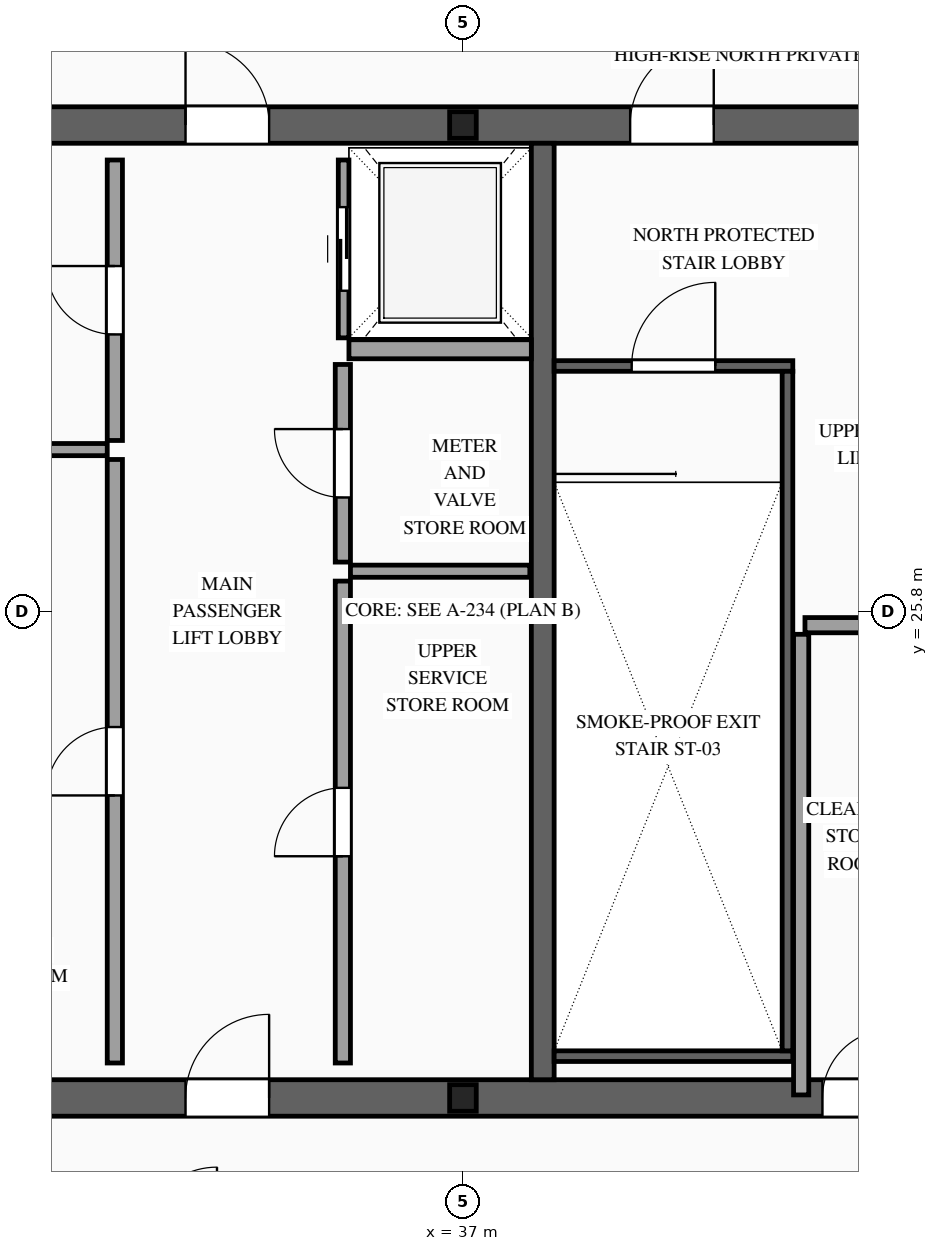
"""IFC4 building model, lengths in metres.
Left out: names, types, materials, properties, quantities, classifications, styles, units other than length and angle.
Written with IfcOpenShell. Run it as: python <this file> out.ifc"""

import sys

from ifc_helpers import new_model, si_unit, direction, frame, frame_2d, origin, origin_2d, place, context, subcontext, project, spatial, rectangle, i_section, extrude, source, transform, mapped, element, fill, save


model = new_model("IFC4")
c1 = context("Model", 3, precision=1e-05, world=origin(), true_north=direction((0.0, 1.0)))
c2 = subcontext(c1, "Body", "Model", "MODEL_VIEW")
j1 = project(units=[si_unit("LENGTHUNIT", "METRE"), si_unit("PLANEANGLEUNIT", "RADIAN")], contexts=[c1])
p1 = place(None, origin())
s1 = spatial("IfcSite", under=j1, at=p1, CompositionType="ELEMENT")
p2 = place(p1, origin())
s2 = spatial("IfcBuilding", under=s1, at=p2, CompositionType="ELEMENT")
p3 = place(p2, frame((0.0, 0.0, 347.2)))
s3 = spatial("IfcBuildingStorey", under=s2, at=p3, CompositionType="ELEMENT", Elevation=347.2)
p4 = place(p3, frame((23.56, 19.4, 0.0), z_axis=(0.0, 0.0, 1.0), x_axis=(1.0, 0.0, 0.0)))
e1 = element("IfcWall", 1, at=p4, inside=s3, PredefinedType="SHEAR", context=c2, shape_type="SweptSolid", body=[
    extrude(rectangle(XDim=26.88, YDim=0.48, at=frame_2d((13.44, 0.0))), origin(), (0.0, 0.0, 1.0), 4.0),
])
p5 = place(p4, frame((1.89, 0.0, 0.0)))
e2 = element("IfcOpeningElement", 2, at=p5, cuts=e1, PredefinedType="OPENING", context=c2, shape_type="SweptSolid", body=[
    extrude(rectangle(XDim=1.1, YDim=2.2, at=frame_2d((0.55, 1.1))), frame((0.0, 0.255, 0.0), z_axis=(0.0, -1.0, 0.0), x_axis=(1.0, 0.0, 0.0)), (0.0, 0.0, 1.0), 0.51),
])
p6 = place(p4, frame((9.79, 0.0, 0.0)))
e3 = element("IfcOpeningElement", 3, at=p6, cuts=e1, PredefinedType="OPENING", context=c2, shape_type="SweptSolid", body=[
    extrude(rectangle(XDim=1.1, YDim=2.2, at=frame_2d((0.55, 1.1))), frame((0.0, 0.255, 0.0), z_axis=(0.0, -1.0, 0.0), x_axis=(1.0, 0.0, 0.0)), (0.0, 0.0, 1.0), 0.51),
])
p7 = place(p4, frame((22.99, 0.0, 0.0)))
e4 = element("IfcOpeningElement", 4, at=p7, cuts=e1, PredefinedType="OPENING", context=c2, shape_type="SweptSolid", body=[
    extrude(rectangle(XDim=1.1, YDim=2.2, at=frame_2d((0.55, 1.1))), frame((0.0, 0.255, 0.0), z_axis=(0.0, -1.0, 0.0), x_axis=(1.0, 0.0, 0.0)), (0.0, 0.0, 1.0), 0.51),
])
p8 = place(p4, frame((19.61, 0.0, 0.0)))
e5 = element("IfcOpeningElement", 5, at=p8, cuts=e1, PredefinedType="OPENING", context=c2, shape_type="SweptSolid", body=[
    extrude(rectangle(XDim=0.9, YDim=2.15, at=frame_2d((0.45, 1.075))), frame((0.0, 0.255, 0.0), z_axis=(0.0, -1.0, 0.0), x_axis=(1.0, 0.0, 0.0)), (0.0, 0.0, 1.0), 0.51),
])
p9 = place(p4, frame((18.17, 0.0, 0.0)))
e6 = element("IfcOpeningElement", 6, at=p9, cuts=e1, PredefinedType="OPENING", context=c2, shape_type="SweptSolid", body=[
    extrude(rectangle(XDim=0.9, YDim=2.15, at=frame_2d((0.45, 1.075))), frame((0.0, 0.255, 0.0), z_axis=(0.0, -1.0, 0.0), x_axis=(1.0, 0.0, 0.0)), (0.0, 0.0, 1.0), 0.51),
])
p10 = place(p3, frame((23.56, 32.2, 0.0), z_axis=(0.0, 0.0, 1.0), x_axis=(1.0, 0.0, 0.0)))
e7 = element("IfcWall", 7, at=p10, inside=s3, PredefinedType="SHEAR", context=c2, shape_type="SweptSolid", body=[
    extrude(rectangle(XDim=26.88, YDim=0.48, at=frame_2d((13.44, 0.0))), origin(), (0.0, 0.0, 1.0), 4.0),
])
p11 = place(p10, frame((4.51, 0.0, 0.0)))
e8 = element("IfcOpeningElement", 8, at=p11, cuts=e7, PredefinedType="OPENING", context=c2, shape_type="SweptSolid", body=[
    extrude(rectangle(XDim=0.9, YDim=2.15, at=frame_2d((0.45, 1.075))), frame((0.0, 0.255, 0.0), z_axis=(0.0, -1.0, 0.0), x_axis=(1.0, 0.0, 0.0)), (0.0, 0.0, 1.0), 0.51),
])
p12 = place(p10, frame((9.79, 0.0, 0.0)))
e9 = element("IfcOpeningElement", 9, at=p12, cuts=e7, PredefinedType="OPENING", context=c2, shape_type="SweptSolid", body=[
    extrude(rectangle(XDim=1.1, YDim=2.2, at=frame_2d((0.55, 1.1))), frame((0.0, 0.255, 0.0), z_axis=(0.0, -1.0, 0.0), x_axis=(1.0, 0.0, 0.0)), (0.0, 0.0, 1.0), 0.51),
])
p13 = place(p10, frame((15.64, 0.0, 0.0)))
e10 = element("IfcOpeningElement", 10, at=p13, cuts=e7, PredefinedType="OPENING", context=c2, shape_type="SweptSolid", body=[
    extrude(rectangle(XDim=1.1, YDim=2.2, at=frame_2d((0.55, 1.1))), frame((0.0, 0.255, 0.0), z_axis=(0.0, -1.0, 0.0), x_axis=(1.0, 0.0, 0.0)), (0.0, 0.0, 1.0), 0.51),
])
p14 = place(p10, frame((18.74, 0.0, 0.0)))
e11 = element("IfcOpeningElement", 11, at=p14, cuts=e7, PredefinedType="OPENING", context=c2, shape_type="SweptSolid", body=[
    extrude(rectangle(XDim=1.1, YDim=2.2, at=frame_2d((0.55, 1.1))), frame((0.0, 0.255, 0.0), z_axis=(0.0, -1.0, 0.0), x_axis=(1.0, 0.0, 0.0)), (0.0, 0.0, 1.0), 0.51),
])
m1 = source(origin(), c2, "Body", "SweptSolid", [
    extrude(rectangle(XDim=12.32, YDim=0.3, at=frame_2d((6.16, 0.0))), origin(), (0.0, 0.0, 1.0), 4.0),
])
p15 = place(p3, frame((38.05, 19.64, 0.0), z_axis=(0.0, 0.0, 1.0), x_axis=(0.0, 1.0, 0.0)))
e12 = element("IfcWall", 12, at=p15, inside=s3, PredefinedType="SOLIDWALL", context=c2, shape_type="MappedRepresentation", body=[
    mapped(m1, transform((0.0, 0.0, 0.0), scale=1.0)),
])
m2 = source(origin(), c2, "Body", "SweptSolid", [
    extrude(i_section(OverallWidth=0.35, OverallDepth=0.35, WebThickness=0.012, FlangeThickness=0.019, at=origin_2d()), origin(), (0.0, 0.0, 1.0), 4.0),
])
for number, where, z_axis, x_axis in (
    (13, (37.0, 19.4, 0.0), (0.0, 0.0, 1.0), (1.0, 0.0, 0.0)),
    (14, (37.0, 32.2, 0.0), (0.0, 0.0, 1.0), (1.0, 0.0, 0.0)),
):
    element("IfcColumn", number, at=place(p3, frame(where, z_axis=z_axis, x_axis=x_axis)), inside=s3, PredefinedType="COLUMN", context=c2, shape_type="MappedRepresentation", body=[
        mapped(m2, transform((0.0, 0.0, 0.0), scale=1.0)),
    ])
p16 = place(p3, frame((35.43, 29.4, 0.0), z_axis=(0.0, 0.0, 1.0), x_axis=(0.0, 1.0, 0.0)))
e15 = element("IfcWall", 15, at=p16, inside=s3, PredefinedType="SOLIDWALL", context=c2, shape_type="SweptSolid", body=[
    extrude(rectangle(XDim=2.34, YDim=0.14, at=frame_2d((1.17, 0.0))), origin(), (0.0, 0.0, 1.0), 3.7),
])
p17 = place(p16, frame((0.62, 0.0, 0.0)))
e16 = element("IfcOpeningElement", 16, at=p17, cuts=e15, PredefinedType="OPENING", context=c2, shape_type="SweptSolid", body=[
    extrude(rectangle(XDim=1.1, YDim=2.2, at=frame_2d((0.55, 1.1))), frame((0.0, 0.085, 0.0), z_axis=(0.0, -1.0, 0.0), x_axis=(1.0, 0.0, 0.0)), (0.0, 0.0, 1.0), 0.17),
])
m3 = source(origin(), c2, "Body", "SweptSolid", [
    extrude(rectangle(XDim=2.4, YDim=0.25, at=frame_2d((1.2, 0.0))), origin(), (0.0, 0.0, 1.0), 3.7),
])
p18 = place(p3, frame((35.5, 29.25, 0.0), z_axis=(0.0, 0.0, 1.0), x_axis=(1.0, 0.0, 0.0)))
e17 = element("IfcWall", 17, at=p18, inside=s3, PredefinedType="SOLIDWALL", context=c2, shape_type="MappedRepresentation", body=[
    mapped(m3, transform((0.0, 0.0, 0.0), scale=1.0)),
])
p19 = place(p3, frame((38.2, 29.03, 0.0), z_axis=(0.0, 0.0, 1.0), x_axis=(1.0, 0.0, 0.0)))
e18 = element("IfcWall", 18, at=p19, inside=s3, PredefinedType="SOLIDWALL", context=c2, shape_type="SweptSolid", body=[
    extrude(rectangle(XDim=3.14, YDim=0.14, at=frame_2d((1.57, 0.0))), origin(), (0.0, 0.0, 1.0), 3.7),
])
p20 = place(p19, frame((1.02, 0.0, 0.0)))
e19 = element("IfcOpeningElement", 19, at=p20, cuts=e18, PredefinedType="OPENING", context=c2, shape_type="SweptSolid", body=[
    extrude(rectangle(XDim=1.1, YDim=2.2, at=frame_2d((0.55, 1.1))), frame((0.0, 0.085, 0.0), z_axis=(0.0, -1.0, 0.0), x_axis=(1.0, 0.0, 0.0)), (0.0, 0.0, 1.0), 0.17),
])
m4 = source(origin(), c2, "Body", "SweptSolid", [
    extrude(rectangle(XDim=3.14, YDim=0.14, at=frame_2d((1.57, 0.0))), origin(), (0.0, 0.0, 1.0), 3.7),
])
p21 = place(p3, frame((38.2, 19.95, 0.0), z_axis=(0.0, 0.0, 1.0), x_axis=(1.0, 0.0, 0.0)))
e20 = element("IfcWall", 20, at=p21, inside=s3, PredefinedType="SOLIDWALL", context=c2, shape_type="MappedRepresentation", body=[
    mapped(m4, transform((0.0, 0.0, 0.0), scale=1.0)),
])
m5 = source(origin(), c2, "Body", "SweptSolid", [
    extrude(rectangle(XDim=8.94, YDim=0.14, at=frame_2d((4.47, 0.0))), origin(), (0.0, 0.0, 1.0), 3.7),
])
p22 = place(p3, frame((41.27, 20.02, 0.0), z_axis=(0.0, 0.0, 1.0), x_axis=(0.0, 1.0, 0.0)))
e21 = element("IfcWall", 21, at=p22, inside=s3, PredefinedType="SOLIDWALL", context=c2, shape_type="MappedRepresentation", body=[
    mapped(m5, transform((0.0, 0.0, 0.0), scale=1.0)),
])
p23 = place(p3, frame((32.42, 19.86, 0.0), z_axis=(0.0, 0.0, 1.0), x_axis=(0.0, 1.0, 0.0)))
e22 = element("IfcWall", 22, at=p23, inside=s3, PredefinedType="PARTITIONING", context=c2, shape_type="SweptSolid", body=[
    extrude(rectangle(XDim=7.94, YDim=0.2, at=frame_2d((3.97, 0.0))), origin(), (0.0, 0.0, 1.0), 3.7),
])
p24 = place(p23, frame((3.52, 0.0, 0.0)))
e23 = element("IfcOpeningElement", 23, at=p24, cuts=e22, PredefinedType="OPENING", context=c2, shape_type="SweptSolid", body=[
    extrude(rectangle(XDim=0.9, YDim=2.15, at=frame_2d((0.45, 1.075))), frame((0.0, 0.115, 0.0), z_axis=(0.0, -1.0, 0.0), x_axis=(1.0, 0.0, 0.0)), (0.0, 0.0, 1.0), 0.23),
])
p25 = place(p3, frame((32.42, 28.05, 0.0), z_axis=(0.0, 0.0, 1.0), x_axis=(0.0, 1.0, 0.0)))
e24 = element("IfcWall", 24, at=p25, inside=s3, PredefinedType="PARTITIONING", context=c2, shape_type="SweptSolid", body=[
    extrude(rectangle(XDim=3.69, YDim=0.2, at=frame_2d((1.845, 0.0))), origin(), (0.0, 0.0, 1.0), 3.7),
])
p26 = place(p25, frame((1.395, 0.0, 0.0)))
e25 = element("IfcOpeningElement", 25, at=p26, cuts=e24, PredefinedType="OPENING", context=c2, shape_type="SweptSolid", body=[
    extrude(rectangle(XDim=0.9, YDim=2.15, at=frame_2d((0.45, 1.075))), frame((0.0, 0.115, 0.0), z_axis=(0.0, -1.0, 0.0), x_axis=(1.0, 0.0, 0.0)), (0.0, 0.0, 1.0), 0.23),
])
m6 = source(origin(), c2, "Body", "SweptSolid", [
    extrude(rectangle(XDim=2.47, YDim=0.16, at=frame_2d((1.235, 0.0))), origin(), (0.0, 0.0, 1.0), 3.7),
])
p27 = place(p3, frame((29.85, 27.93, 0.0), z_axis=(0.0, 0.0, 1.0), x_axis=(1.0, 0.0, 0.0)))
e26 = element("IfcWall", 26, at=p27, inside=s3, PredefinedType="PARTITIONING", context=c2, shape_type="MappedRepresentation", body=[
    mapped(m6, transform((0.0, 0.0, 0.0), scale=1.0)),
])
p28 = place(p3, frame((35.42, 19.86, 0.0), z_axis=(0.0, 0.0, 1.0), x_axis=(0.0, 1.0, 0.0)))
e27 = element("IfcWall", 27, at=p28, inside=s3, PredefinedType="PARTITIONING", context=c2, shape_type="SweptSolid", body=[
    extrude(rectangle(XDim=6.34, YDim=0.2, at=frame_2d((3.17, 0.0))), origin(), (0.0, 0.0, 1.0), 3.7),
])
p29 = place(p28, frame((2.72, 0.0, 0.0)))
e28 = element("IfcOpeningElement", 28, at=p29, cuts=e27, PredefinedType="OPENING", context=c2, shape_type="SweptSolid", body=[
    extrude(rectangle(XDim=0.9, YDim=2.15, at=frame_2d((0.45, 1.075))), frame((0.0, 0.115, 0.0), z_axis=(0.0, -1.0, 0.0), x_axis=(1.0, 0.0, 0.0)), (0.0, 0.0, 1.0), 0.23),
])
p30 = place(p3, frame((35.42, 26.45, 0.0), z_axis=(0.0, 0.0, 1.0), x_axis=(0.0, 1.0, 0.0)))
e29 = element("IfcWall", 29, at=p30, inside=s3, PredefinedType="PARTITIONING", context=c2, shape_type="SweptSolid", body=[
    extrude(rectangle(XDim=2.6, YDim=0.2, at=frame_2d((1.3, 0.0))), origin(), (0.0, 0.0, 1.0), 3.7),
])
p31 = place(p30, frame((0.85, 0.0, 0.0)))
e30 = element("IfcOpeningElement", 30, at=p31, cuts=e29, PredefinedType="OPENING", context=c2, shape_type="SweptSolid", body=[
    extrude(rectangle(XDim=0.9, YDim=2.15, at=frame_2d((0.45, 1.075))), frame((0.0, 0.115, 0.0), z_axis=(0.0, -1.0, 0.0), x_axis=(1.0, 0.0, 0.0)), (0.0, 0.0, 1.0), 0.23),
])
m7 = source(origin(), c2, "Body", "SweptSolid", [
    extrude(rectangle(XDim=2.36, YDim=0.16, at=frame_2d((1.18, 0.0))), origin(), (0.0, 0.0, 1.0), 3.7),
])
p32 = place(p3, frame((35.52, 26.33, 0.0), z_axis=(0.0, 0.0, 1.0), x_axis=(1.0, 0.0, 0.0)))
e31 = element("IfcWall", 31, at=p32, inside=s3, PredefinedType="PARTITIONING", context=c2, shape_type="MappedRepresentation", body=[
    mapped(m7, transform((0.0, 0.0, 0.0), scale=1.0)),
])
m8 = source(origin(), c2, "Body", "SweptSolid", [
    extrude(rectangle(XDim=6.06, YDim=0.2, at=frame_2d((3.03, 0.0))), origin(), (0.0, 0.0, 1.0), 3.7),
])
p33 = place(p3, frame((41.45, 19.44, 0.0), z_axis=(0.0, 0.0, 1.0), x_axis=(0.0, 1.0, 0.0)))
e32 = element("IfcWall", 32, at=p33, inside=s3, PredefinedType="PARTITIONING", context=c2, shape_type="MappedRepresentation", body=[
    mapped(m8, transform((0.0, 0.0, 0.0), scale=1.0)),
])
m9 = source(origin(), c2, "Body", "SweptSolid", [
    extrude(rectangle(XDim=1.35, YDim=0.2, at=frame_2d((0.675, 0.0))), origin(), (0.0, 0.0, 1.0), 3.7),
])
p34 = place(p3, frame((41.5, 25.62, 0.0), z_axis=(0.0, 0.0, 1.0), x_axis=(1.0, 0.0, 0.0)))
e33 = element("IfcWall", 33, at=p34, inside=s3, PredefinedType="PARTITIONING", context=c2, shape_type="MappedRepresentation", body=[
    mapped(m9, transform((0.0, 0.0, 0.0), scale=1.0)),
])
m10 = source(origin(), c2, "Body", "SweptSolid", [
    extrude(rectangle(XDim=1.1, YDim=2.2, at=frame_2d((0.55, 1.1))), frame((0.0, 0.025, 0.0), z_axis=(0.0, -1.0, 0.0), x_axis=(1.0, 0.0, 0.0)), (0.0, 0.0, 1.0), 0.05),
])
p35 = place(p17, origin())
e34 = element("IfcDoor", 34, at=p35, inside=s3, OperationType="SLIDING_TO_RIGHT", PredefinedType="DOOR", context=c2, shape_type="MappedRepresentation", body=[
    mapped(m10, transform((0.0, 0.0, 0.0), scale=1.0)),
])
fill(e16, e34)
m11 = source(origin(), c2, "Body", "SweptSolid", [
    extrude(rectangle(XDim=1.1, YDim=2.2, at=frame_2d((0.55, 1.1))), frame((0.0, 0.025, 0.0), z_axis=(0.0, -1.0, 0.0), x_axis=(1.0, 0.0, 0.0)), (0.0, 0.0, 1.0), 0.05),
])
p36 = place(p20, origin())
e35 = element("IfcDoor", 35, at=p36, inside=s3, OperationType="SINGLE_SWING_RIGHT", PredefinedType="DOOR", context=c2, shape_type="MappedRepresentation", body=[
    mapped(m11, transform((0.0, 0.0, 0.0), scale=1.0)),
])
fill(e19, e35)
p37 = place(p6, origin())
e36 = element("IfcDoor", 36, at=p37, inside=s3, OperationType="SINGLE_SWING_RIGHT", PredefinedType="DOOR", context=c2, shape_type="MappedRepresentation", body=[
    mapped(m11, transform((0.0, 0.0, 0.0), scale=1.0)),
])
fill(e3, e36)
p38 = place(p12, origin())
e37 = element("IfcDoor", 37, at=p38, inside=s3, OperationType="SINGLE_SWING_LEFT", PredefinedType="DOOR", context=c2, shape_type="MappedRepresentation", body=[
    mapped(m11, transform((0.0, 0.0, 0.0), scale=1.0)),
])
fill(e9, e37)
p39 = place(p13, origin())
e38 = element("IfcDoor", 38, at=p39, inside=s3, OperationType="SINGLE_SWING_RIGHT", PredefinedType="DOOR", context=c2, shape_type="MappedRepresentation", body=[
    mapped(m11, transform((0.0, 0.0, 0.0), scale=1.0)),
])
fill(e10, e38)
m12 = source(origin(), c2, "Body", "SweptSolid", [
    extrude(rectangle(XDim=0.9, YDim=2.15, at=frame_2d((0.45, 1.075))), frame((0.0, 0.025, 0.0), z_axis=(0.0, -1.0, 0.0), x_axis=(1.0, 0.0, 0.0)), (0.0, 0.0, 1.0), 0.05),
])
p40 = place(p24, origin())
e39 = element("IfcDoor", 39, at=p40, inside=s3, OperationType="SINGLE_SWING_LEFT", PredefinedType="DOOR", context=c2, shape_type="MappedRepresentation", body=[
    mapped(m12, transform((0.0, 0.0, 0.0), scale=1.0)),
])
fill(e23, e39)
p41 = place(p26, origin())
e40 = element("IfcDoor", 40, at=p41, inside=s3, OperationType="SINGLE_SWING_RIGHT", PredefinedType="DOOR", context=c2, shape_type="MappedRepresentation", body=[
    mapped(m12, transform((0.0, 0.0, 0.0), scale=1.0)),
])
fill(e25, e40)
p42 = place(p29, origin())
e41 = element("IfcDoor", 41, at=p42, inside=s3, OperationType="SINGLE_SWING_LEFT", PredefinedType="DOOR", context=c2, shape_type="MappedRepresentation", body=[
    mapped(m12, transform((0.0, 0.0, 0.0), scale=1.0)),
])
fill(e28, e41)
p43 = place(p31, origin())
e42 = element("IfcDoor", 42, at=p43, inside=s3, OperationType="SINGLE_SWING_RIGHT", PredefinedType="DOOR", context=c2, shape_type="MappedRepresentation", body=[
    mapped(m12, transform((0.0, 0.0, 0.0), scale=1.0)),
])
fill(e30, e42)
p44 = place(p9, origin())
e43 = element("IfcDoor", 43, at=p44, inside=s3, OperationType="SINGLE_SWING_RIGHT", PredefinedType="DOOR", context=c2, shape_type="MappedRepresentation", body=[
    mapped(m12, transform((0.0, 0.0, 0.0), scale=1.0)),
])
fill(e6, e43)
save(model, sys.argv[1])
